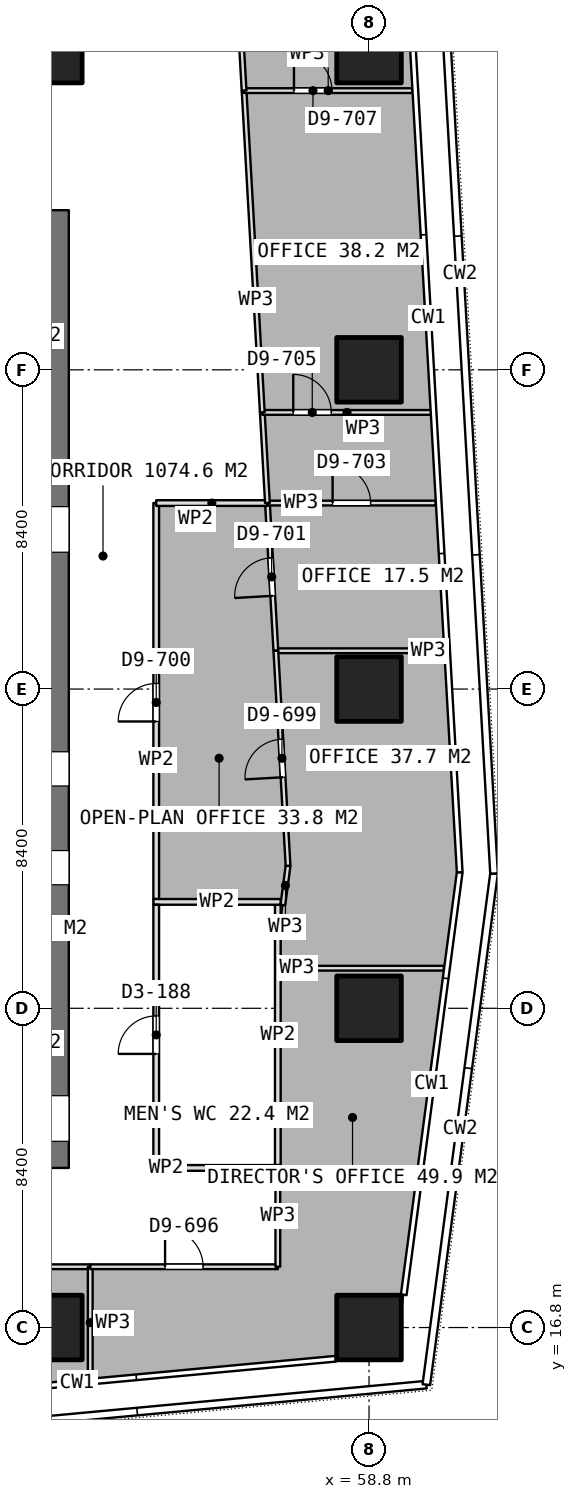
"""IFC4 building model, lengths in metres.
Left out: names, types, materials, properties, quantities, classifications, styles, units other than length and angle.
Written with IfcOpenShell. Run it as: python <this file> out.ifc"""

import sys

from ifc_helpers import new_model, si_unit, direction, frame, frame_2d, origin, origin_2d, place, context, subcontext, project, spatial, rectangle, extrude, element, fill, save


model = new_model("IFC4")
c1 = context("Model", 3, precision=1e-05, world=origin(), true_north=direction((0.0, 1.0)))
c2 = subcontext(c1, "Body", "Model", "MODEL_VIEW")
j1 = project(units=[si_unit("LENGTHUNIT", "METRE"), si_unit("PLANEANGLEUNIT", "RADIAN")], contexts=[c1])
p1 = place(None, origin())
s1 = spatial("IfcSite", under=j1, at=p1, CompositionType="ELEMENT")
p2 = place(p1, origin())
s2 = spatial("IfcBuilding", under=s1, at=p2, CompositionType="ELEMENT")
p3 = place(p2, frame((0.0, 0.0, 180.2)))
s3 = spatial("IfcBuildingStorey", under=s2, at=p3, CompositionType="ELEMENT", Elevation=180.2)
p4 = place(p3, frame((50.4, 21.0, 0.0), z_axis=(0.0, 0.0, 1.0), x_axis=(0.0, 1.0, 0.0)))
e1 = element("IfcWall", 1, at=p4, inside=s3, PredefinedType="SHEAR", context=c2, shape_type="SweptSolid", body=[
    extrude(rectangle(XDim=25.2, YDim=1.0, at=frame_2d((12.6, 0.0))), origin(), (0.0, 0.0, 1.0), 3.75),
])
p5 = place(p4, frame((16.2, 0.0, 0.0)))
e2 = element("IfcOpeningElement", 2, at=p5, cuts=e1, PredefinedType="OPENING", context=c2, shape_type="SweptSolid", body=[
    extrude(rectangle(XDim=1.2, YDim=2.1, at=frame_2d((0.6, 1.05))), frame((0.0, 0.51, 0.0), z_axis=(0.0, -1.0, 0.0), x_axis=(1.0, 0.0, 0.0)), (0.0, 0.0, 1.0), 1.02),
])
p6 = place(p4, frame((10.05, 0.0, 0.0)))
e3 = element("IfcOpeningElement", 3, at=p6, cuts=e1, PredefinedType="OPENING", context=c2, shape_type="SweptSolid", body=[
    extrude(rectangle(XDim=0.9, YDim=2.1, at=frame_2d((0.45, 1.05))), frame((0.0, 0.51, 0.0), z_axis=(0.0, -1.0, 0.0), x_axis=(1.0, 0.0, 0.0)), (0.0, 0.0, 1.0), 1.02),
])
p7 = place(p4, frame((7.45, 0.0, 0.0)))
e4 = element("IfcOpeningElement", 4, at=p7, cuts=e1, PredefinedType="OPENING", context=c2, shape_type="SweptSolid", body=[
    extrude(rectangle(XDim=0.9, YDim=2.1, at=frame_2d((0.45, 1.05))), frame((0.0, 0.51, 0.0), z_axis=(0.0, -1.0, 0.0), x_axis=(1.0, 0.0, 0.0)), (0.0, 0.0, 1.0), 1.02),
])
p8 = place(p4, frame((0.7, 0.0, 0.0)))
e5 = element("IfcOpeningElement", 5, at=p8, cuts=e1, PredefinedType="OPENING", context=c2, shape_type="SweptSolid", body=[
    extrude(rectangle(XDim=1.2, YDim=2.1, at=frame_2d((0.6, 1.05))), frame((0.0, 0.51, 0.0), z_axis=(0.0, -1.0, 0.0), x_axis=(1.0, 0.0, 0.0)), (0.0, 0.0, 1.0), 1.02),
])
for number, where, z_axis, x_axis in (
    (6, (50.4, 16.8, 0.0), (0.0, 0.0, 1.0), (1.0, 0.0, 0.0)),
    (7, (50.4, 50.4, 0.0), (0.0, 0.0, 1.0), (1.0, 0.0, 0.0)),
    (8, (58.8, 16.8, 0.0), (0.0, 0.0, 1.0), (1.0, 0.0, 0.0)),
    (9, (58.8, 25.2, 0.0), (0.0, 0.0, 1.0), (1.0, 0.0, 0.0)),
    (10, (58.8, 33.6, 0.0), (0.0, 0.0, 1.0), (1.0, 0.0, 0.0)),
    (11, (58.8, 42.0, 0.0), (0.0, 0.0, 1.0), (1.0, 0.0, 0.0)),
    (12, (58.8, 50.4, 0.0), (0.0, 0.0, 1.0), (1.0, 0.0, 0.0)),
):
    element("IfcColumn", number, at=place(p3, frame(where, z_axis=z_axis, x_axis=x_axis)), inside=s3, PredefinedType="COLUMN", context=c2, shape_type="SweptSolid", body=[
        extrude(rectangle(XDim=1.7, YDim=1.7, at=origin_2d()), origin(), (0.0, 0.0, 1.0), 3.75),
    ])
for number, where, z_axis, x_axis in (
    (13, (53.125, 21.0, 0.0), (0.0, 0.0, 1.0), (1.0, 0.0, 0.0)),
    (14, (53.125, 28.0, 0.0), (0.0, 0.0, 1.0), (1.0, 0.0, 0.0)),
):
    element("IfcWall", number, at=place(p3, frame(where, z_axis=z_axis, x_axis=x_axis)), inside=s3, PredefinedType="PARTITIONING", context=c2, shape_type="SweptSolid", body=[
        extrude(rectangle(XDim=3.35, YDim=0.15, at=frame_2d((1.675, 0.0))), origin(), (0.0, 0.0, 1.0), 3.5),
    ])
p9 = place(p3, frame((53.2, 21.075, 0.0), z_axis=(0.0, 0.0, 1.0), x_axis=(0.0, 1.0, 0.0)))
e15 = element("IfcWall", 15, at=p9, inside=s3, PredefinedType="PARTITIONING", context=c2, shape_type="SweptSolid", body=[
    extrude(rectangle(XDim=6.85, YDim=0.15, at=frame_2d((3.425, 0.0))), origin(), (0.0, 0.0, 1.0), 3.5),
])
p10 = place(p9, frame((2.925, 0.0, 0.0)))
e16 = element("IfcOpeningElement", 16, at=p10, cuts=e15, PredefinedType="OPENING", context=c2, shape_type="SweptSolid", body=[
    extrude(rectangle(XDim=1.0, YDim=2.1, at=frame_2d((0.5, 1.05))), frame((0.0, 0.085, 0.0), z_axis=(0.0, -1.0, 0.0), x_axis=(1.0, 0.0, 0.0)), (0.0, 0.0, 1.0), 0.17),
])
p11 = place(p3, frame((56.4, 21.075, 0.0), z_axis=(0.0, 0.0, 1.0), x_axis=(0.0, 1.0, 0.0)))
e17 = element("IfcWall", 17, at=p11, inside=s3, PredefinedType="PARTITIONING", context=c2, shape_type="SweptSolid", body=[
    extrude(rectangle(XDim=6.85, YDim=0.15, at=frame_2d((3.425, 0.0))), origin(), (0.0, 0.0, 1.0), 3.5),
])
p12 = place(p3, frame((42.998, 18.4, 0.0), z_axis=(0.0, 0.0, 1.0), x_axis=(1.0, 0.0, 0.0)))
e18 = element("IfcWall", 18, at=p12, inside=s3, PredefinedType="PARTITIONING", context=c2, shape_type="SweptSolid", body=[
    extrude(rectangle(XDim=8.466, YDim=0.125, at=frame_2d((4.233, 0.0))), origin(), (0.0, 0.0, 1.0), 3.5),
])
p13 = place(p12, frame((3.733, 0.0, 0.0)))
e19 = element("IfcOpeningElement", 19, at=p13, cuts=e18, PredefinedType="OPENING", context=c2, shape_type="SweptSolid", body=[
    extrude(rectangle(XDim=1.0, YDim=2.1, at=frame_2d((0.5, 1.05))), frame((0.0, 0.073, 0.0), z_axis=(0.0, -1.0, 0.0), x_axis=(1.0, 0.0, 0.0)), (0.0, 0.0, 1.0), 0.145),
])
p14 = place(p3, frame((51.464, 18.4, 0.0), z_axis=(0.0, 0.0, 1.0), x_axis=(0.0, -1.0, 0.0)))
e20 = element("IfcWall", 20, at=p14, inside=s3, PredefinedType="PARTITIONING", context=c2, shape_type="SweptSolid", body=[
    extrude(rectangle(XDim=2.942, YDim=0.125, at=frame_2d((1.471, 0.0))), origin(), (0.0, 0.0, 1.0), 3.5),
])
p15 = place(p3, frame((51.465, 18.4, 0.0), z_axis=(0.0, 0.0, 1.0), x_axis=(1.0, 0.0, 0.0)))
e21 = element("IfcWall", 21, at=p15, inside=s3, PredefinedType="PARTITIONING", context=c2, shape_type="SweptSolid", body=[
    extrude(rectangle(XDim=4.935, YDim=0.125, at=frame_2d((2.467, 0.0))), origin(), (0.0, 0.0, 1.0), 3.5),
])
p16 = place(p15, frame((1.968, 0.0, 0.0)))
e22 = element("IfcOpeningElement", 22, at=p16, cuts=e21, PredefinedType="OPENING", context=c2, shape_type="SweptSolid", body=[
    extrude(rectangle(XDim=1.0, YDim=2.1, at=frame_2d((0.5, 1.05))), frame((0.0, 0.073, 0.0), z_axis=(0.0, -1.0, 0.0), x_axis=(1.0, 0.0, 0.0)), (0.0, 0.0, 1.0), 0.145),
])
p17 = place(p3, frame((56.4, 18.4, 0.0), z_axis=(0.0, 0.0, 1.0), x_axis=(0.0, 1.0, 0.0)))
e23 = element("IfcWall", 23, at=p17, inside=s3, PredefinedType="PARTITIONING", context=c2, shape_type="SweptSolid", body=[
    extrude(rectangle(XDim=2.675, YDim=0.125, at=frame_2d((1.337, 0.0))), origin(), (0.0, 0.0, 1.0), 3.5),
])
p18 = place(p3, frame((56.475, 26.255, 0.0), z_axis=(0.0, 0.0, 1.0), x_axis=(1.0, 0.0, 0.0)))
e24 = element("IfcWall", 24, at=p18, inside=s3, PredefinedType="PARTITIONING", context=c2, shape_type="SweptSolid", body=[
    extrude(rectangle(XDim=4.296, YDim=0.125, at=frame_2d((2.148, 0.0))), origin(), (0.0, 0.0, 1.0), 3.5),
])
p19 = place(p3, frame((56.669, 28.949, 0.0), z_axis=(0.0, 0.0, 1.0), x_axis=(-0.05664130847, 0.998394592421, 0.0)))
e25 = element("IfcWall", 25, at=p19, inside=s3, PredefinedType="PARTITIONING", context=c2, shape_type="SweptSolid", body=[
    extrude(rectangle(XDim=5.668, YDim=0.125, at=frame_2d((2.834, 0.0))), origin(), (0.0, 0.0, 1.0), 3.5),
])
p20 = place(p19, frame((2.334, 0.0, 0.0)))
e26 = element("IfcOpeningElement", 26, at=p20, cuts=e25, PredefinedType="OPENING", context=c2, shape_type="SweptSolid", body=[
    extrude(rectangle(XDim=1.0, YDim=2.1, at=frame_2d((0.5, 1.05))), frame((0.0, 0.073, 0.0), z_axis=(0.0, -1.0, 0.0), x_axis=(1.0, 0.0, 0.0)), (0.0, 0.0, 1.0), 0.145),
])
p21 = place(p3, frame((56.348, 34.608, 0.0), z_axis=(0.0, 0.0, 1.0), x_axis=(1.0, 0.0, 0.0)))
e27 = element("IfcWall", 27, at=p21, inside=s3, PredefinedType="PARTITIONING", context=c2, shape_type="SweptSolid", body=[
    extrude(rectangle(XDim=4.457, YDim=0.125, at=frame_2d((2.229, 0.0))), origin(), (0.0, 0.0, 1.0), 3.5),
])
p22 = place(p3, frame((56.533, 27.918, 0.0), z_axis=(0.0, 0.0, 1.0), x_axis=(0.130764223689, 0.991413494866, 0.0)))
e28 = element("IfcWall", 28, at=p22, inside=s3, PredefinedType="PARTITIONING", context=c2, shape_type="SweptSolid", body=[
    extrude(rectangle(XDim=1.04, YDim=0.125, at=frame_2d((0.52, 0.0))), origin(), (0.0, 0.0, 1.0), 3.5),
])
p23 = place(p3, frame((56.348, 34.609, 0.0), z_axis=(0.0, 0.0, 1.0), x_axis=(-0.056779989764, 0.998386715037, 0.0)))
e29 = element("IfcWall", 29, at=p23, inside=s3, PredefinedType="PARTITIONING", context=c2, shape_type="SweptSolid", body=[
    extrude(rectangle(XDim=3.891, YDim=0.125, at=frame_2d((1.946, 0.0))), origin(), (0.0, 0.0, 1.0), 3.5),
])
p24 = place(p23, frame((1.446, 0.0, 0.0)))
e30 = element("IfcOpeningElement", 30, at=p24, cuts=e29, PredefinedType="OPENING", context=c2, shape_type="SweptSolid", body=[
    extrude(rectangle(XDim=1.0, YDim=2.1, at=frame_2d((0.5, 1.05))), frame((0.0, 0.073, 0.0), z_axis=(0.0, -1.0, 0.0), x_axis=(1.0, 0.0, 0.0)), (0.0, 0.0, 1.0), 0.145),
])
p25 = place(p3, frame((56.127, 38.494, 0.0), z_axis=(0.0, 0.0, 1.0), x_axis=(1.0, 0.0, 0.0)))
e31 = element("IfcWall", 31, at=p25, inside=s3, PredefinedType="PARTITIONING", context=c2, shape_type="SweptSolid", body=[
    extrude(rectangle(XDim=4.428, YDim=0.125, at=frame_2d((2.214, 0.0))), origin(), (0.0, 0.0, 1.0), 3.5),
])
p26 = place(p25, frame((1.714, 0.0, 0.0)))
e32 = element("IfcOpeningElement", 32, at=p26, cuts=e31, PredefinedType="OPENING", context=c2, shape_type="SweptSolid", body=[
    extrude(rectangle(XDim=1.0, YDim=2.1, at=frame_2d((0.5, 1.05))), frame((0.0, 0.073, 0.0), z_axis=(0.0, -1.0, 0.0), x_axis=(1.0, 0.0, 0.0)), (0.0, 0.0, 1.0), 0.145),
])
p27 = place(p3, frame((53.2, 28.075, 0.0), z_axis=(0.0, 0.0, 1.0), x_axis=(0.0, 1.0, 0.0)))
e33 = element("IfcWall", 33, at=p27, inside=s3, PredefinedType="PARTITIONING", context=c2, shape_type="SweptSolid", body=[
    extrude(rectangle(XDim=10.419, YDim=0.15, at=frame_2d((5.209, 0.0))), origin(), (0.0, 0.0, 1.0), 3.5),
])
p28 = place(p27, frame((4.672, 0.0, 0.0)))
e34 = element("IfcOpeningElement", 34, at=p28, cuts=e33, PredefinedType="OPENING", context=c2, shape_type="SweptSolid", body=[
    extrude(rectangle(XDim=1.0, YDim=2.1, at=frame_2d((0.5, 1.05))), frame((0.0, 0.085, 0.0), z_axis=(0.0, -1.0, 0.0), x_axis=(1.0, 0.0, 0.0)), (0.0, 0.0, 1.0), 0.17),
])
p29 = place(p3, frame((53.2, 38.494, 0.0), z_axis=(0.0, 0.0, 1.0), x_axis=(1.0, 0.0, 0.0)))
e35 = element("IfcWall", 35, at=p29, inside=s3, PredefinedType="PARTITIONING", context=c2, shape_type="SweptSolid", body=[
    extrude(rectangle(XDim=2.927, YDim=0.15, at=frame_2d((1.463, 0.0))), origin(), (0.0, 0.0, 1.0), 3.5),
])
p30 = place(p3, frame((56.127, 38.495, 0.0), z_axis=(0.0, 0.0, 1.0), x_axis=(-0.056546005431, 0.998399994626, 0.0)))
e36 = element("IfcWall", 36, at=p30, inside=s3, PredefinedType="PARTITIONING", context=c2, shape_type="SweptSolid", body=[
    extrude(rectangle(XDim=2.388, YDim=0.125, at=frame_2d((1.194, 0.0))), origin(), (0.0, 0.0, 1.0), 3.5),
])
p31 = place(p3, frame((55.992, 40.879, 0.0), z_axis=(0.0, 0.0, 1.0), x_axis=(1.0, 0.0, 0.0)))
e37 = element("IfcWall", 37, at=p31, inside=s3, PredefinedType="PARTITIONING", context=c2, shape_type="SweptSolid", body=[
    extrude(rectangle(XDim=4.457, YDim=0.125, at=frame_2d((2.229, 0.0))), origin(), (0.0, 0.0, 1.0), 3.5),
])
p32 = place(p31, frame((0.814, 0.0, 0.0)))
e38 = element("IfcOpeningElement", 38, at=p32, cuts=e37, PredefinedType="OPENING", context=c2, shape_type="SweptSolid", body=[
    extrude(rectangle(XDim=1.0, YDim=2.1, at=frame_2d((0.5, 1.05))), frame((0.0, 0.073, 0.0), z_axis=(0.0, -1.0, 0.0), x_axis=(1.0, 0.0, 0.0)), (0.0, 0.0, 1.0), 0.145),
])
p33 = place(p3, frame((55.992, 40.88, 0.0), z_axis=(0.0, 0.0, 1.0), x_axis=(-0.056603741884, 0.998396722954, 0.0)))
e39 = element("IfcWall", 39, at=p33, inside=s3, PredefinedType="PARTITIONING", context=c2, shape_type="SweptSolid", body=[
    extrude(rectangle(XDim=8.48, YDim=0.125, at=frame_2d((4.24, 0.0))), origin(), (0.0, 0.0, 1.0), 3.5),
])
p34 = place(p3, frame((55.512, 49.346, 0.0), z_axis=(0.0, 0.0, 1.0), x_axis=(1.0, 0.0, 0.0)))
e40 = element("IfcWall", 40, at=p34, inside=s3, PredefinedType="PARTITIONING", context=c2, shape_type="SweptSolid", body=[
    extrude(rectangle(XDim=4.427, YDim=0.125, at=frame_2d((2.213, 0.0))), origin(), (0.0, 0.0, 1.0), 3.5),
])
p35 = place(p34, frame((1.313, 0.0, 0.0)))
e41 = element("IfcOpeningElement", 41, at=p35, cuts=e40, PredefinedType="OPENING", context=c2, shape_type="SweptSolid", body=[
    extrude(rectangle(XDim=1.0, YDim=2.1, at=frame_2d((0.5, 1.05))), frame((0.0, 0.073, 0.0), z_axis=(0.0, -1.0, 0.0), x_axis=(1.0, 0.0, 0.0)), (0.0, 0.0, 1.0), 0.145),
])
p36 = place(p3, frame((55.512, 49.347, 0.0), z_axis=(0.0, 0.0, 1.0), x_axis=(-0.056790198377, 0.998386134403, 0.0)))
e42 = element("IfcWall", 42, at=p36, inside=s3, PredefinedType="PARTITIONING", context=c2, shape_type="SweptSolid", body=[
    extrude(rectangle(XDim=7.098, YDim=0.125, at=frame_2d((3.549, 0.0))), origin(), (0.0, 0.0, 1.0), 3.5),
])
p37 = place(p10, origin())
e43 = element("IfcDoor", 43, at=p37, inside=s3, OperationType="SINGLE_SWING_LEFT", PredefinedType="DOOR", context=c2, shape_type="SweptSolid", body=[
    extrude(rectangle(XDim=1.0, YDim=2.1, at=frame_2d((0.5, 1.05))), frame((0.0, 0.025, 0.0), z_axis=(0.0, -1.0, 0.0), x_axis=(1.0, 0.0, 0.0)), (0.0, 0.0, 1.0), 0.05),
])
fill(e16, e43)
p38 = place(p16, origin())
e44 = element("IfcDoor", 44, at=p38, inside=s3, OperationType="SINGLE_SWING_LEFT", PredefinedType="DOOR", context=c2, shape_type="SweptSolid", body=[
    extrude(rectangle(XDim=1.0, YDim=2.1, at=frame_2d((0.5, 1.05))), frame((0.0, 0.025, 0.0), z_axis=(0.0, -1.0, 0.0), x_axis=(1.0, 0.0, 0.0)), (0.0, 0.0, 1.0), 0.05),
])
fill(e22, e44)
p39 = place(p20, origin())
e45 = element("IfcDoor", 45, at=p39, inside=s3, OperationType="SINGLE_SWING_LEFT", PredefinedType="DOOR", context=c2, shape_type="SweptSolid", body=[
    extrude(rectangle(XDim=1.0, YDim=2.1, at=frame_2d((0.5, 1.05))), frame((0.0, 0.025, 0.0), z_axis=(0.0, -1.0, 0.0), x_axis=(1.0, 0.0, 0.0)), (0.0, 0.0, 1.0), 0.05),
])
fill(e26, e45)
p40 = place(p24, origin())
e46 = element("IfcDoor", 46, at=p40, inside=s3, OperationType="SINGLE_SWING_LEFT", PredefinedType="DOOR", context=c2, shape_type="SweptSolid", body=[
    extrude(rectangle(XDim=1.0, YDim=2.1, at=frame_2d((0.5, 1.05))), frame((0.0, 0.025, 0.0), z_axis=(0.0, -1.0, 0.0), x_axis=(1.0, 0.0, 0.0)), (0.0, 0.0, 1.0), 0.05),
])
fill(e30, e46)
p41 = place(p28, origin())
e47 = element("IfcDoor", 47, at=p41, inside=s3, OperationType="SINGLE_SWING_LEFT", PredefinedType="DOOR", context=c2, shape_type="SweptSolid", body=[
    extrude(rectangle(XDim=1.0, YDim=2.1, at=frame_2d((0.5, 1.05))), frame((0.0, 0.025, 0.0), z_axis=(0.0, -1.0, 0.0), x_axis=(1.0, 0.0, 0.0)), (0.0, 0.0, 1.0), 0.05),
])
fill(e34, e47)
p42 = place(p26, origin())
e48 = element("IfcDoor", 48, at=p42, inside=s3, OperationType="SINGLE_SWING_LEFT", PredefinedType="DOOR", context=c2, shape_type="SweptSolid", body=[
    extrude(rectangle(XDim=1.0, YDim=2.1, at=frame_2d((0.5, 1.05))), frame((0.0, 0.025, 0.0), z_axis=(0.0, -1.0, 0.0), x_axis=(1.0, 0.0, 0.0)), (0.0, 0.0, 1.0), 0.05),
])
fill(e32, e48)
p43 = place(p32, origin())
e49 = element("IfcDoor", 49, at=p43, inside=s3, OperationType="SINGLE_SWING_LEFT", PredefinedType="DOOR", context=c2, shape_type="SweptSolid", body=[
    extrude(rectangle(XDim=1.0, YDim=2.1, at=frame_2d((0.5, 1.05))), frame((0.0, 0.025, 0.0), z_axis=(0.0, -1.0, 0.0), x_axis=(1.0, 0.0, 0.0)), (0.0, 0.0, 1.0), 0.05),
])
fill(e38, e49)
p44 = place(p35, origin())
e50 = element("IfcDoor", 50, at=p44, inside=s3, OperationType="SINGLE_SWING_LEFT", PredefinedType="DOOR", context=c2, shape_type="SweptSolid", body=[
    extrude(rectangle(XDim=1.0, YDim=2.1, at=frame_2d((0.5, 1.05))), frame((0.0, 0.025, 0.0), z_axis=(0.0, -1.0, 0.0), x_axis=(1.0, 0.0, 0.0)), (0.0, 0.0, 1.0), 0.05),
])
fill(e41, e50)
save(model, sys.argv[1])
